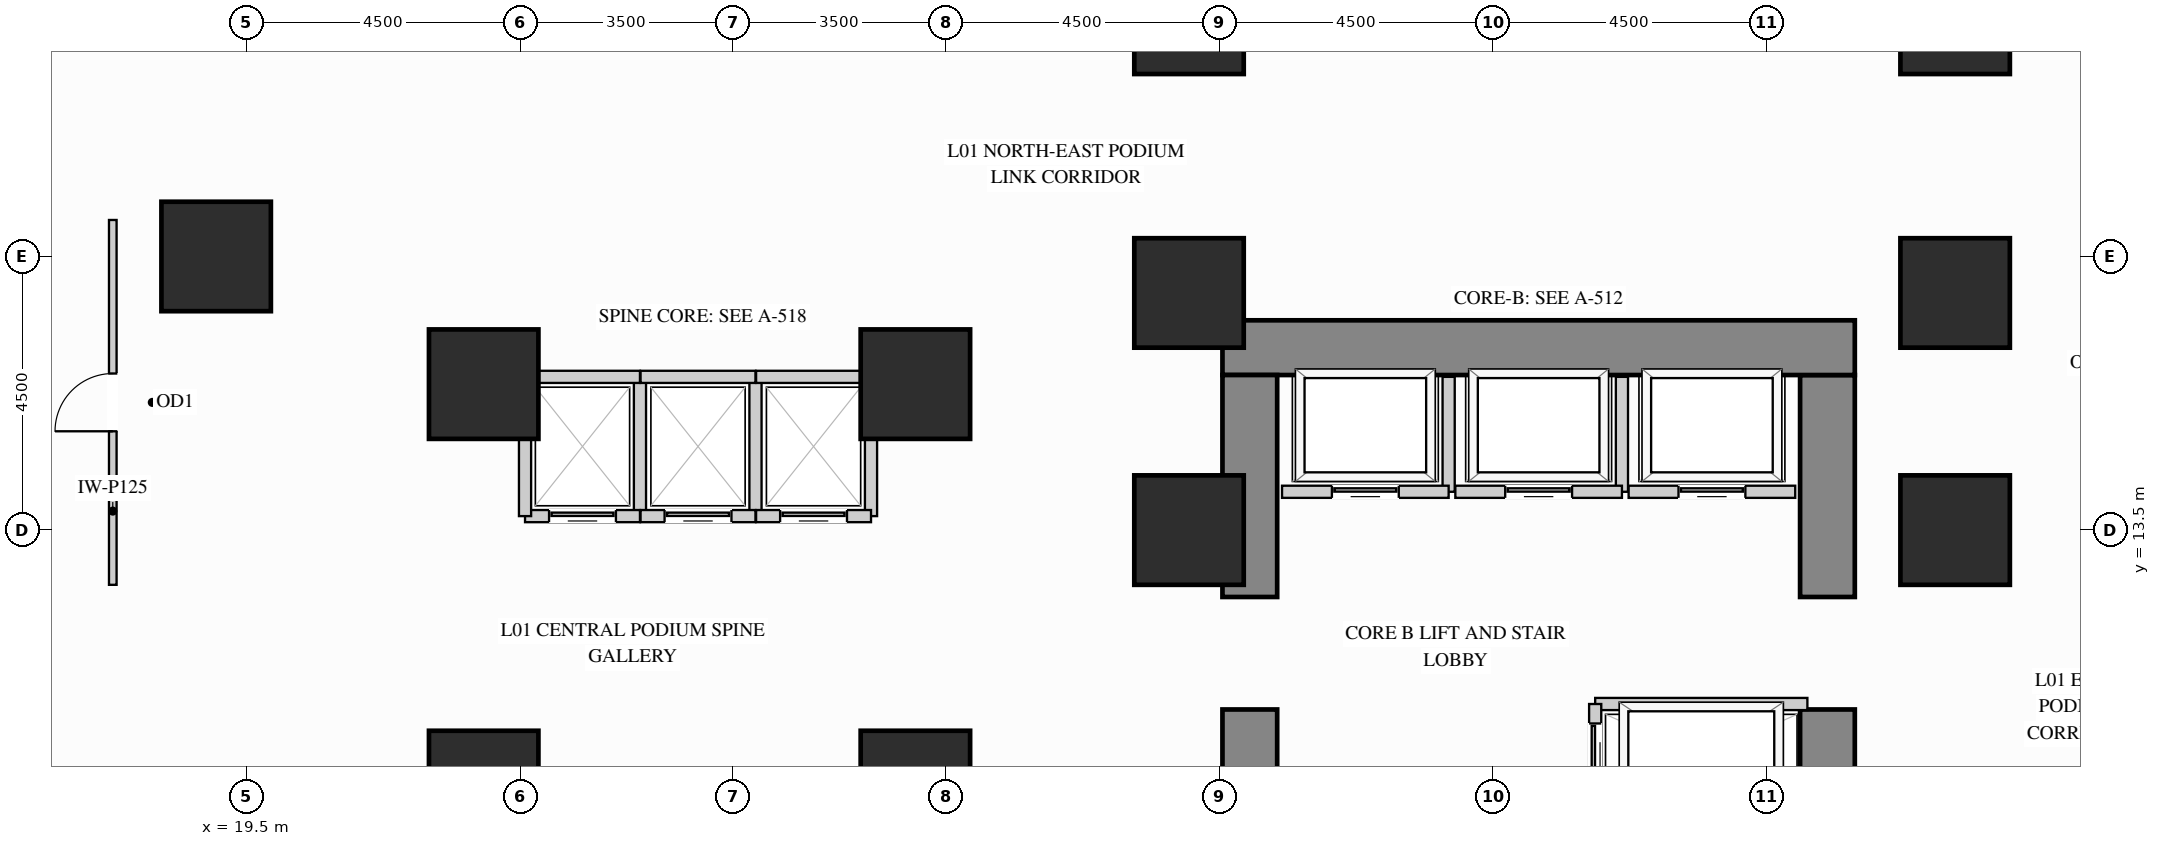
"""IFC4 building model, lengths in metres.
Left out: names, types, materials, properties, quantities, classifications, styles, units other than length and angle.
Written with IfcOpenShell. Run it as: python <this file> out.ifc"""

import sys

from ifc_helpers import new_model, si_unit, direction, frame, frame_2d, origin, origin_2d, place, context, subcontext, project, spatial, rectangle, extrude, source, transform, mapped, element, fill, save


model = new_model("IFC4")
c1 = context("Model", 3, precision=1e-05, world=origin(), true_north=direction((0.0, 1.0)))
c2 = subcontext(c1, "Body", "Model", "MODEL_VIEW")
j1 = project(units=[si_unit("LENGTHUNIT", "METRE"), si_unit("PLANEANGLEUNIT", "RADIAN")], contexts=[c1])
p1 = place(None, origin())
s1 = spatial("IfcSite", under=j1, at=p1, CompositionType="ELEMENT")
p2 = place(p1, origin())
s2 = spatial("IfcBuilding", under=s1, at=p2, CompositionType="ELEMENT")
p3 = place(p2, frame((0.0, 0.0, 4.5)))
s3 = spatial("IfcBuildingStorey", under=s2, at=p3, CompositionType="ELEMENT", Elevation=4.5)
m1 = source(origin(), c2, "Body", "SweptSolid", [
    extrude(rectangle(XDim=1.8, YDim=1.8, at=origin_2d()), origin(), (0.0, 0.0, 1.0), 4.25),
])
for number, where, z_axis, x_axis in (
    (1, (47.6, 13.5, 0.0), (0.0, 0.0, 1.0), (1.0, 0.0, 0.0)),
    (2, (47.6, 17.4, 0.0), (0.0, 0.0, 1.0), (1.0, 0.0, 0.0)),
    (3, (47.6, 21.9, 0.0), (0.0, 0.0, 1.0), (1.0, 0.0, 0.0)),
    (4, (19.0, 18.0, 0.0), (0.0, 0.0, 1.0), (1.0, 0.0, 0.0)),
    (5, (35.0, 13.5, 0.0), (0.0, 0.0, 1.0), (1.0, 0.0, 0.0)),
    (6, (35.0, 17.4, 0.0), (0.0, 0.0, 1.0), (1.0, 0.0, 0.0)),
    (7, (35.0, 21.9, 0.0), (0.0, 0.0, 1.0), (1.0, 0.0, 0.0)),
    (8, (23.4, 9.3, 0.0), (0.0, 0.0, 1.0), (1.0, 0.0, 0.0)),
    (9, (30.5, 9.3, 0.0), (0.0, 0.0, 1.0), (1.0, 0.0, 0.0)),
    (10, (23.4, 15.9, 0.0), (0.0, 0.0, 1.0), (1.0, 0.0, 0.0)),
    (11, (30.5, 15.9, 0.0), (0.0, 0.0, 1.0), (1.0, 0.0, 0.0)),
):
    element("IfcColumn", number, at=place(p3, frame(where, z_axis=z_axis, x_axis=x_axis)), inside=s3, PredefinedType="COLUMN", context=c2, shape_type="MappedRepresentation", body=[
        mapped(m1, transform((0.0, 0.0, 0.0), x_axis=(1.0, 0.0, 0.0), y_axis=(0.0, 1.0, 0.0), z_axis=(0.0, 0.0, 1.0))),
    ])
m2 = source(origin(), c2, "Body", "SweptSolid", [
    extrude(rectangle(XDim=5.6, YDim=0.9, at=frame_2d((2.8, 0.0))), origin(), (0.0, 0.0, 1.0), 4.25),
])
p4 = place(p3, frame((45.5, 4.95, 0.0), z_axis=(0.0, 0.0, 1.0), x_axis=(0.0, 1.0, 0.0)))
e12 = element("IfcWall", 12, at=p4, inside=s3, PredefinedType="SHEAR", context=c2, shape_type="MappedRepresentation", body=[
    mapped(m2, transform((0.0, 0.0, 0.0), x_axis=(1.0, 0.0, 0.0), y_axis=(0.0, 1.0, 0.0), z_axis=(0.0, 0.0, 1.0))),
])
m3 = source(origin(), c2, "Body", "SweptSolid", [
    extrude(rectangle(XDim=3.65, YDim=0.9, at=frame_2d((1.825, 0.0))), origin(), (0.0, 0.0, 1.0), 4.25),
])
p5 = place(p3, frame((45.5, 12.4, 0.0), z_axis=(0.0, 0.0, 1.0), x_axis=(0.0, 1.0, 0.0)))
e13 = element("IfcWall", 13, at=p5, inside=s3, PredefinedType="SHEAR", context=c2, shape_type="MappedRepresentation", body=[
    mapped(m3, transform((0.0, 0.0, 0.0), x_axis=(1.0, 0.0, 0.0), y_axis=(0.0, 1.0, 0.0), z_axis=(0.0, 0.0, 1.0))),
])
m4 = source(origin(), c2, "Body", "SweptSolid", [
    extrude(rectangle(XDim=10.4, YDim=0.9, at=frame_2d((5.2, 0.0))), origin(), (0.0, 0.0, 1.0), 4.25),
])
p6 = place(p3, frame((35.55, 16.5, 0.0), z_axis=(0.0, 0.0, 1.0), x_axis=(1.0, 0.0, 0.0)))
e14 = element("IfcWall", 14, at=p6, inside=s3, PredefinedType="SHEAR", context=c2, shape_type="MappedRepresentation", body=[
    mapped(m4, transform((0.0, 0.0, 0.0), x_axis=(1.0, 0.0, 0.0), y_axis=(0.0, 1.0, 0.0), z_axis=(0.0, 0.0, 1.0))),
])
p7 = place(p3, frame((36.0, 4.95, 0.0), z_axis=(0.0, 0.0, 1.0), x_axis=(0.0, 1.0, 0.0)))
e15 = element("IfcWall", 15, at=p7, inside=s3, PredefinedType="SHEAR", context=c2, shape_type="MappedRepresentation", body=[
    mapped(m2, transform((0.0, 0.0, 0.0), x_axis=(1.0, 0.0, 0.0), y_axis=(0.0, 1.0, 0.0), z_axis=(0.0, 0.0, 1.0))),
])
p8 = place(p3, frame((36.0, 12.4, 0.0), z_axis=(0.0, 0.0, 1.0), x_axis=(0.0, 1.0, 0.0)))
e16 = element("IfcWall", 16, at=p8, inside=s3, PredefinedType="SHEAR", context=c2, shape_type="MappedRepresentation", body=[
    mapped(m3, transform((0.0, 0.0, 0.0), x_axis=(1.0, 0.0, 0.0), y_axis=(0.0, 1.0, 0.0), z_axis=(0.0, 0.0, 1.0))),
])
p9 = place(p3, frame((17.3, 12.6, 0.0), z_axis=(0.0, 0.0, 1.0), x_axis=(0.0, 1.0, 0.0)))
e17 = element("IfcWall", 17, at=p9, inside=s3, PredefinedType="PARTITIONING", context=c2, shape_type="SweptSolid", body=[
    extrude(rectangle(XDim=6.0, YDim=0.125, at=frame_2d((3.0, 0.0))), origin(), (0.0, 0.0, 1.0), 4.235),
])
p10 = place(p9, frame((2.525, 0.0, 0.0)))
e18 = element("IfcOpeningElement", 18, at=p10, cuts=e17, PredefinedType="OPENING", context=c2, shape_type="SweptSolid", body=[
    extrude(rectangle(XDim=0.95, YDim=2.15, at=frame_2d((0.475, 1.075))), frame((0.0, 0.073, 0.0), z_axis=(0.0, -1.0, 0.0), x_axis=(1.0, 0.0, 0.0)), (0.0, 0.0, 1.0), 0.145),
])
m5 = source(origin(), c2, "Body", "SweptSolid", [
    extrude(rectangle(XDim=1.89, YDim=0.2, at=frame_2d((0.945, 0.0))), origin(), (0.0, 0.0, 1.0), 4.235),
])
p11 = place(p3, frame((39.27, 14.13, 0.0), z_axis=(0.0, 0.0, 1.0), x_axis=(0.0, 1.0, 0.0)))
e19 = element("IfcWall", 19, at=p11, inside=s3, PredefinedType="PARTITIONING", context=c2, shape_type="MappedRepresentation", body=[
    mapped(m5, transform((0.0, 0.0, 0.0), x_axis=(1.0, 0.0, 0.0), y_axis=(0.0, 1.0, 0.0), z_axis=(0.0, 0.0, 1.0))),
])
p12 = place(p3, frame((36.53, 14.13, 0.0), z_axis=(0.0, 0.0, 1.0), x_axis=(1.0, 0.0, 0.0)))
e20 = element("IfcWall", 20, at=p12, inside=s3, PredefinedType="PARTITIONING", context=c2, shape_type="SweptSolid", body=[
    extrude(rectangle(XDim=2.74, YDim=0.2, at=frame_2d((1.37, 0.0))), origin(), (0.0, 0.0, 1.0), 4.235),
])
p13 = place(p12, frame((0.82, 0.0, 0.0)))
e21 = element("IfcOpeningElement", 21, at=p13, cuts=e20, PredefinedType="OPENING", context=c2, shape_type="SweptSolid", body=[
    extrude(rectangle(XDim=1.1, YDim=2.2, at=frame_2d((0.55, 1.1))), frame((0.0, 0.11, 0.0), z_axis=(0.0, -1.0, 0.0), x_axis=(1.0, 0.0, 0.0)), (0.0, 0.0, 1.0), 0.22),
])
p14 = place(p3, frame((42.12, 14.13, 0.0), z_axis=(0.0, 0.0, 1.0), x_axis=(0.0, 1.0, 0.0)))
e22 = element("IfcWall", 22, at=p14, inside=s3, PredefinedType="PARTITIONING", context=c2, shape_type="MappedRepresentation", body=[
    mapped(m5, transform((0.0, 0.0, 0.0), x_axis=(1.0, 0.0, 0.0), y_axis=(0.0, 1.0, 0.0), z_axis=(0.0, 0.0, 1.0))),
])
p15 = place(p3, frame((39.38, 14.13, 0.0), z_axis=(0.0, 0.0, 1.0), x_axis=(1.0, 0.0, 0.0)))
e23 = element("IfcWall", 23, at=p15, inside=s3, PredefinedType="PARTITIONING", context=c2, shape_type="SweptSolid", body=[
    extrude(rectangle(XDim=2.74, YDim=0.2, at=frame_2d((1.37, 0.0))), origin(), (0.0, 0.0, 1.0), 4.235),
])
p16 = place(p15, frame((0.82, 0.0, 0.0)))
e24 = element("IfcOpeningElement", 24, at=p16, cuts=e23, PredefinedType="OPENING", context=c2, shape_type="SweptSolid", body=[
    extrude(rectangle(XDim=1.1, YDim=2.2, at=frame_2d((0.55, 1.1))), frame((0.0, 0.11, 0.0), z_axis=(0.0, -1.0, 0.0), x_axis=(1.0, 0.0, 0.0)), (0.0, 0.0, 1.0), 0.22),
])
p17 = place(p3, frame((42.23, 14.13, 0.0), z_axis=(0.0, 0.0, 1.0), x_axis=(1.0, 0.0, 0.0)))
e25 = element("IfcWall", 25, at=p17, inside=s3, PredefinedType="PARTITIONING", context=c2, shape_type="SweptSolid", body=[
    extrude(rectangle(XDim=2.74, YDim=0.2, at=frame_2d((1.37, 0.0))), origin(), (0.0, 0.0, 1.0), 4.235),
])
p18 = place(p17, frame((0.82, 0.0, 0.0)))
e26 = element("IfcOpeningElement", 26, at=p18, cuts=e25, PredefinedType="OPENING", context=c2, shape_type="SweptSolid", body=[
    extrude(rectangle(XDim=1.1, YDim=2.2, at=frame_2d((0.55, 1.1))), frame((0.0, 0.11, 0.0), z_axis=(0.0, -1.0, 0.0), x_axis=(1.0, 0.0, 0.0)), (0.0, 0.0, 1.0), 0.22),
])
m6 = source(origin(), c2, "Body", "SweptSolid", [
    extrude(rectangle(XDim=2.29, YDim=0.2, at=frame_2d((1.145, 0.0))), origin(), (0.0, 0.0, 1.0), 4.235),
])
p19 = place(p3, frame((25.97, 13.73, 0.0), z_axis=(0.0, 0.0, 1.0), x_axis=(0.0, 1.0, 0.0)))
e27 = element("IfcWall", 27, at=p19, inside=s3, PredefinedType="PARTITIONING", context=c2, shape_type="MappedRepresentation", body=[
    mapped(m6, transform((0.0, 0.0, 0.0), x_axis=(1.0, 0.0, 0.0), y_axis=(0.0, 1.0, 0.0), z_axis=(0.0, 0.0, 1.0))),
])
m7 = source(origin(), c2, "Body", "SweptSolid", [
    extrude(rectangle(XDim=1.89, YDim=0.2, at=frame_2d((0.945, 0.0))), origin(), (0.0, 0.0, 1.0), 4.235),
])
p20 = place(p3, frame((24.08, 16.02, 0.0), z_axis=(0.0, 0.0, 1.0), x_axis=(1.0, 0.0, 0.0)))
e28 = element("IfcWall", 28, at=p20, inside=s3, PredefinedType="PARTITIONING", context=c2, shape_type="MappedRepresentation", body=[
    mapped(m7, transform((0.0, 0.0, 0.0), x_axis=(1.0, 0.0, 0.0), y_axis=(0.0, 1.0, 0.0), z_axis=(0.0, 0.0, 1.0))),
])
p21 = place(p3, frame((24.08, 13.73, 0.0), z_axis=(0.0, 0.0, 1.0), x_axis=(1.0, 0.0, 0.0)))
e29 = element("IfcWall", 29, at=p21, inside=s3, PredefinedType="PARTITIONING", context=c2, shape_type="SweptSolid", body=[
    extrude(rectangle(XDim=1.89, YDim=0.2, at=frame_2d((0.945, 0.0))), origin(), (0.0, 0.0, 1.0), 4.235),
])
p22 = place(p21, frame((0.395, 0.0, 0.0)))
e30 = element("IfcOpeningElement", 30, at=p22, cuts=e29, PredefinedType="OPENING", context=c2, shape_type="SweptSolid", body=[
    extrude(rectangle(XDim=1.1, YDim=2.2, at=frame_2d((0.55, 1.1))), frame((0.0, 0.11, 0.0), z_axis=(0.0, -1.0, 0.0), x_axis=(1.0, 0.0, 0.0)), (0.0, 0.0, 1.0), 0.22),
])
for number, where, z_axis, x_axis in (
    (31, (24.08, 13.73, 0.0), (0.0, 0.0, 1.0), (0.0, 1.0, 0.0)),
    (32, (27.87, 13.73, 0.0), (0.0, 0.0, 1.0), (0.0, 1.0, 0.0)),
):
    element("IfcWall", number, at=place(p3, frame(where, z_axis=z_axis, x_axis=x_axis)), inside=s3, PredefinedType="PARTITIONING", context=c2, shape_type="MappedRepresentation", body=[
        mapped(m6, transform((0.0, 0.0, 0.0), x_axis=(1.0, 0.0, 0.0), y_axis=(0.0, 1.0, 0.0), z_axis=(0.0, 0.0, 1.0))),
    ])
p23 = place(p3, frame((25.98, 16.02, 0.0), z_axis=(0.0, 0.0, 1.0), x_axis=(1.0, 0.0, 0.0)))
e33 = element("IfcWall", 33, at=p23, inside=s3, PredefinedType="PARTITIONING", context=c2, shape_type="MappedRepresentation", body=[
    mapped(m5, transform((0.0, 0.0, 0.0), x_axis=(1.0, 0.0, 0.0), y_axis=(0.0, 1.0, 0.0), z_axis=(0.0, 0.0, 1.0))),
])
p24 = place(p3, frame((25.98, 13.73, 0.0), z_axis=(0.0, 0.0, 1.0), x_axis=(1.0, 0.0, 0.0)))
e34 = element("IfcWall", 34, at=p24, inside=s3, PredefinedType="PARTITIONING", context=c2, shape_type="SweptSolid", body=[
    extrude(rectangle(XDim=1.89, YDim=0.2, at=frame_2d((0.945, 0.0))), origin(), (0.0, 0.0, 1.0), 4.235),
])
p25 = place(p24, frame((0.395, 0.0, 0.0)))
e35 = element("IfcOpeningElement", 35, at=p25, cuts=e34, PredefinedType="OPENING", context=c2, shape_type="SweptSolid", body=[
    extrude(rectangle(XDim=1.1, YDim=2.2, at=frame_2d((0.55, 1.1))), frame((0.0, 0.11, 0.0), z_axis=(0.0, -1.0, 0.0), x_axis=(1.0, 0.0, 0.0)), (0.0, 0.0, 1.0), 0.22),
])
p26 = place(p3, frame((29.77, 13.73, 0.0), z_axis=(0.0, 0.0, 1.0), x_axis=(0.0, 1.0, 0.0)))
e36 = element("IfcWall", 36, at=p26, inside=s3, PredefinedType="PARTITIONING", context=c2, shape_type="MappedRepresentation", body=[
    mapped(m6, transform((0.0, 0.0, 0.0), x_axis=(1.0, 0.0, 0.0), y_axis=(0.0, 1.0, 0.0), z_axis=(0.0, 0.0, 1.0))),
])
p27 = place(p3, frame((27.88, 16.02, 0.0), z_axis=(0.0, 0.0, 1.0), x_axis=(1.0, 0.0, 0.0)))
e37 = element("IfcWall", 37, at=p27, inside=s3, PredefinedType="PARTITIONING", context=c2, shape_type="MappedRepresentation", body=[
    mapped(m5, transform((0.0, 0.0, 0.0), x_axis=(1.0, 0.0, 0.0), y_axis=(0.0, 1.0, 0.0), z_axis=(0.0, 0.0, 1.0))),
])
p28 = place(p3, frame((27.88, 13.73, 0.0), z_axis=(0.0, 0.0, 1.0), x_axis=(1.0, 0.0, 0.0)))
e38 = element("IfcWall", 38, at=p28, inside=s3, PredefinedType="PARTITIONING", context=c2, shape_type="SweptSolid", body=[
    extrude(rectangle(XDim=1.89, YDim=0.2, at=frame_2d((0.945, 0.0))), origin(), (0.0, 0.0, 1.0), 4.235),
])
p29 = place(p28, frame((0.395, 0.0, 0.0)))
e39 = element("IfcOpeningElement", 39, at=p29, cuts=e38, PredefinedType="OPENING", context=c2, shape_type="SweptSolid", body=[
    extrude(rectangle(XDim=1.1, YDim=2.2, at=frame_2d((0.55, 1.1))), frame((0.0, 0.11, 0.0), z_axis=(0.0, -1.0, 0.0), x_axis=(1.0, 0.0, 0.0)), (0.0, 0.0, 1.0), 0.22),
])
m8 = source(origin(), c2, "Body", "SweptSolid", [
    extrude(rectangle(XDim=3.49, YDim=0.2, at=frame_2d((1.745, 0.0))), origin(), (0.0, 0.0, 1.0), 4.235),
])
p30 = place(p3, frame((41.68, 10.64, 0.0), z_axis=(0.0, 0.0, 1.0), x_axis=(1.0, 0.0, 0.0)))
e40 = element("IfcWall", 40, at=p30, inside=s3, PredefinedType="PARTITIONING", context=c2, shape_type="MappedRepresentation", body=[
    mapped(m8, transform((0.0, 0.0, 0.0), x_axis=(1.0, 0.0, 0.0), y_axis=(0.0, 1.0, 0.0), z_axis=(0.0, 0.0, 1.0))),
])
p31 = place(p3, frame((41.68, 8.9, 0.0), z_axis=(0.0, 0.0, 1.0), x_axis=(0.0, 1.0, 0.0)))
e41 = element("IfcWall", 41, at=p31, inside=s3, PredefinedType="PARTITIONING", context=c2, shape_type="SweptSolid", body=[
    extrude(rectangle(XDim=1.74, YDim=0.2, at=frame_2d((0.87, 0.0))), origin(), (0.0, 0.0, 1.0), 4.235),
])
p32 = place(p31, frame((0.32, 0.0, 0.0)))
e42 = element("IfcOpeningElement", 42, at=p32, cuts=e41, PredefinedType="OPENING", context=c2, shape_type="SweptSolid", body=[
    extrude(rectangle(XDim=1.1, YDim=2.2, at=frame_2d((0.55, 1.1))), frame((0.0, 0.11, 0.0), z_axis=(0.0, -1.0, 0.0), x_axis=(1.0, 0.0, 0.0)), (0.0, 0.0, 1.0), 0.22),
])
m9 = source(origin(), c2, "Body", "SweptSolid", [
    extrude(rectangle(XDim=1.1, YDim=2.2, at=frame_2d((0.55, 1.1))), frame((0.0, 0.025, 0.0), z_axis=(0.0, -1.0, 0.0), x_axis=(1.0, 0.0, 0.0)), (0.0, 0.0, 1.0), 0.05),
])
p33 = place(p13, origin())
e43 = element("IfcDoor", 43, at=p33, inside=s3, OperationType="SLIDING_TO_LEFT", PredefinedType="DOOR", context=c2, shape_type="MappedRepresentation", body=[
    mapped(m9, transform((0.0, 0.0, 0.0), x_axis=(1.0, 0.0, 0.0), y_axis=(0.0, 1.0, 0.0), z_axis=(0.0, 0.0, 1.0))),
])
fill(e21, e43)
p34 = place(p16, origin())
e44 = element("IfcDoor", 44, at=p34, inside=s3, OperationType="SLIDING_TO_LEFT", PredefinedType="DOOR", context=c2, shape_type="MappedRepresentation", body=[
    mapped(m9, transform((0.0, 0.0, 0.0), x_axis=(1.0, 0.0, 0.0), y_axis=(0.0, 1.0, 0.0), z_axis=(0.0, 0.0, 1.0))),
])
fill(e24, e44)
p35 = place(p18, origin())
e45 = element("IfcDoor", 45, at=p35, inside=s3, OperationType="SLIDING_TO_LEFT", PredefinedType="DOOR", context=c2, shape_type="MappedRepresentation", body=[
    mapped(m9, transform((0.0, 0.0, 0.0), x_axis=(1.0, 0.0, 0.0), y_axis=(0.0, 1.0, 0.0), z_axis=(0.0, 0.0, 1.0))),
])
fill(e26, e45)
p36 = place(p22, origin())
e46 = element("IfcDoor", 46, at=p36, inside=s3, OperationType="SLIDING_TO_LEFT", PredefinedType="DOOR", context=c2, shape_type="MappedRepresentation", body=[
    mapped(m9, transform((0.0, 0.0, 0.0), x_axis=(1.0, 0.0, 0.0), y_axis=(0.0, 1.0, 0.0), z_axis=(0.0, 0.0, 1.0))),
])
fill(e30, e46)
p37 = place(p25, origin())
e47 = element("IfcDoor", 47, at=p37, inside=s3, OperationType="SLIDING_TO_LEFT", PredefinedType="DOOR", context=c2, shape_type="MappedRepresentation", body=[
    mapped(m9, transform((0.0, 0.0, 0.0), x_axis=(1.0, 0.0, 0.0), y_axis=(0.0, 1.0, 0.0), z_axis=(0.0, 0.0, 1.0))),
])
fill(e35, e47)
p38 = place(p29, origin())
e48 = element("IfcDoor", 48, at=p38, inside=s3, OperationType="SLIDING_TO_LEFT", PredefinedType="DOOR", context=c2, shape_type="MappedRepresentation", body=[
    mapped(m9, transform((0.0, 0.0, 0.0), x_axis=(1.0, 0.0, 0.0), y_axis=(0.0, 1.0, 0.0), z_axis=(0.0, 0.0, 1.0))),
])
fill(e39, e48)
p39 = place(p32, origin())
e49 = element("IfcDoor", 49, at=p39, inside=s3, OperationType="SLIDING_TO_LEFT", PredefinedType="DOOR", context=c2, shape_type="MappedRepresentation", body=[
    mapped(m9, transform((0.0, 0.0, 0.0), x_axis=(1.0, 0.0, 0.0), y_axis=(0.0, 1.0, 0.0), z_axis=(0.0, 0.0, 1.0))),
])
fill(e42, e49)
m10 = source(origin(), c2, "Body", "SweptSolid", [
    extrude(rectangle(XDim=0.95, YDim=2.15, at=frame_2d((0.475, 1.075))), frame((0.0, 0.025, 0.0), z_axis=(0.0, -1.0, 0.0), x_axis=(1.0, 0.0, 0.0)), (0.0, 0.0, 1.0), 0.05),
])
p40 = place(p10, origin())
e50 = element("IfcDoor", 50, at=p40, inside=s3, OperationType="SINGLE_SWING_LEFT", PredefinedType="DOOR", context=c2, shape_type="MappedRepresentation", body=[
    mapped(m10, transform((0.0, 0.0, 0.0), x_axis=(1.0, 0.0, 0.0), y_axis=(0.0, 1.0, 0.0), z_axis=(0.0, 0.0, 1.0))),
])
fill(e18, e50)
save(model, sys.argv[1])
